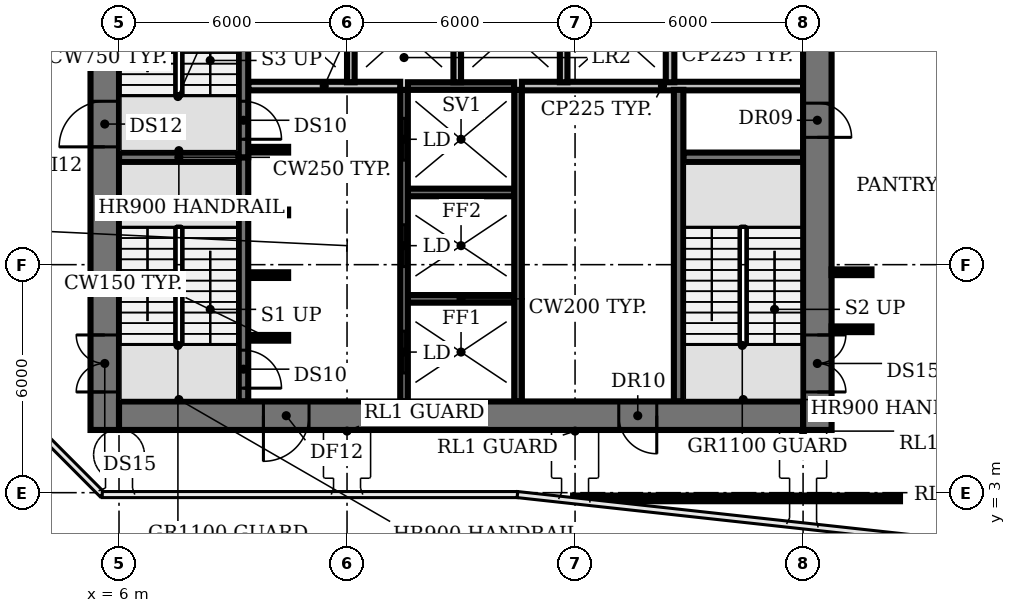
"""IFC4 building model, lengths in metres.
Left out: names, types, materials, properties, quantities, classifications, styles, units other than length and angle.
Written with IfcOpenShell. Run it as: python <this file> out.ifc"""

import sys

from ifc_helpers import new_model, si_unit, direction, frame, frame_2d, origin, place, context, subcontext, project, spatial, rectangle, extrude, element, fill, save


model = new_model("IFC4")
c1 = context("Model", 3, precision=1e-05, world=origin(), true_north=direction((0.0, 1.0)))
c2 = subcontext(c1, "Body", "Model", "MODEL_VIEW")
j1 = project(units=[si_unit("LENGTHUNIT", "METRE"), si_unit("PLANEANGLEUNIT", "RADIAN")], contexts=[c1])
p1 = place(None, origin())
s1 = spatial("IfcSite", under=j1, at=p1, CompositionType="ELEMENT")
p2 = place(p1, origin())
s2 = spatial("IfcBuilding", under=s1, at=p2, CompositionType="ELEMENT")
p3 = place(p2, frame((0.0, 0.0, 138.2)))
s3 = spatial("IfcBuildingStorey", under=s2, at=p3, CompositionType="ELEMENT", Elevation=138.2)
p4 = place(p3, frame((9.4, 7.075, 0.0), z_axis=(0.0, 0.0, 1.0), x_axis=(1.0, 0.0, 0.0)))
e1 = element("IfcWall", 1, at=p4, inside=s3, PredefinedType="SHEAR", context=c2, shape_type="SweptSolid", body=[
    extrude(rectangle(XDim=1.05, YDim=0.15, at=frame_2d((0.525, 0.0))), origin(), (0.0, 0.0, 1.0), 8.05),
])
p5 = place(p3, frame((13.6, 8.1, 0.0), z_axis=(0.0, 0.0, 1.0), x_axis=(1.0, 0.0, 0.0)))
e2 = element("IfcWall", 2, at=p5, inside=s3, PredefinedType="SHEAR", context=c2, shape_type="SweptSolid", body=[
    extrude(rectangle(XDim=2.8, YDim=0.2, at=frame_2d((1.4, 0.0))), origin(), (0.0, 0.0, 1.0), 8.05),
])
for number, where, z_axis, x_axis in (
    (3, (9.4, 8.725, 0.0), (0.0, 0.0, 1.0), (1.0, 0.0, 0.0)),
    (4, (9.4, 10.375, 0.0), (0.0, 0.0, 1.0), (1.0, 0.0, 0.0)),
):
    element("IfcWall", number, at=place(p3, frame(where, z_axis=z_axis, x_axis=x_axis)), inside=s3, PredefinedType="SHEAR", context=c2, shape_type="SweptSolid", body=[
        extrude(rectangle(XDim=1.05, YDim=0.15, at=frame_2d((0.525, 0.0))), origin(), (0.0, 0.0, 1.0), 8.05),
    ])
p6 = place(p3, frame((13.6, 10.9, 0.0), z_axis=(0.0, 0.0, 1.0), x_axis=(1.0, 0.0, 0.0)))
e5 = element("IfcWall", 5, at=p6, inside=s3, PredefinedType="SHEAR", context=c2, shape_type="SweptSolid", body=[
    extrude(rectangle(XDim=2.8, YDim=0.2, at=frame_2d((1.4, 0.0))), origin(), (0.0, 0.0, 1.0), 8.05),
])
for number, where, z_axis, x_axis in (
    (6, (6.0, 11.825, 0.0), (0.0, 0.0, 1.0), (1.0, 0.0, 0.0)),
    (7, (20.85, 11.825, 0.0), (0.0, 0.0, 1.0), (1.0, 0.0, 0.0)),
):
    element("IfcWall", number, at=place(p3, frame(where, z_axis=z_axis, x_axis=x_axis)), inside=s3, PredefinedType="SHEAR", context=c2, shape_type="SweptSolid", body=[
        extrude(rectangle(XDim=3.15, YDim=0.25, at=frame_2d((1.575, 0.0))), origin(), (0.0, 0.0, 1.0), 8.05),
    ])
p7 = place(p3, frame((9.4, 12.025, 0.0), z_axis=(0.0, 0.0, 1.0), x_axis=(1.0, 0.0, 0.0)))
e8 = element("IfcWall", 8, at=p7, inside=s3, PredefinedType="SHEAR", context=c2, shape_type="SweptSolid", body=[
    extrude(rectangle(XDim=1.05, YDim=0.15, at=frame_2d((0.525, 0.0))), origin(), (0.0, 0.0, 1.0), 8.05),
])
p8 = place(p3, frame((9.4, 13.7, 0.0), z_axis=(0.0, 0.0, 1.0), x_axis=(1.0, 0.0, 0.0)))
e9 = element("IfcWall", 9, at=p8, inside=s3, PredefinedType="PARTITIONING", context=c2, shape_type="SweptSolid", body=[
    extrude(rectangle(XDim=4.0, YDim=0.225, at=frame_2d((2.0, 0.0))), origin(), (0.0, 0.0, 1.0), 8.05),
])
p9 = place(p3, frame((13.6, 13.7, 0.0), z_axis=(0.0, 0.0, 1.0), x_axis=(1.0, 0.0, 0.0)))
e10 = element("IfcWall", 10, at=p9, inside=s3, PredefinedType="SHEAR", context=c2, shape_type="SweptSolid", body=[
    extrude(rectangle(XDim=2.8, YDim=0.2, at=frame_2d((1.4, 0.0))), origin(), (0.0, 0.0, 1.0), 8.05),
])
p10 = place(p3, frame((16.6, 13.7, 0.0), z_axis=(0.0, 0.0, 1.0), x_axis=(1.0, 0.0, 0.0)))
e11 = element("IfcWall", 11, at=p10, inside=s3, PredefinedType="PARTITIONING", context=c2, shape_type="SweptSolid", body=[
    extrude(rectangle(XDim=7.4, YDim=0.225, at=frame_2d((3.7, 0.0))), origin(), (0.0, 0.0, 1.0), 8.05),
])
p11 = place(p3, frame((9.275, 11.825, 0.0), z_axis=(0.0, 0.0, 1.0), x_axis=(0.0, -1.0, 0.0)))
e12 = element("IfcWall", 12, at=p11, inside=s3, PredefinedType="SHEAR", context=c2, shape_type="SweptSolid", body=[
    extrude(rectangle(XDim=6.425, YDim=0.25, at=frame_2d((3.212, 0.0))), origin(), (0.0, 0.0, 1.0), 8.05),
])
p12 = place(p11, frame((5.075, 0.0, 0.0)))
e13 = element("IfcOpeningElement", 13, at=p12, cuts=e12, PredefinedType="OPENING", context=c2, shape_type="SweptSolid", body=[
    extrude(rectangle(XDim=1.0, YDim=2.1, at=frame_2d((0.5, 1.05))), frame((0.0, 0.135, 0.0), z_axis=(0.0, -1.0, 0.0), x_axis=(1.0, 0.0, 0.0)), (0.0, 0.0, 1.0), 0.27),
])
p13 = place(p3, frame((9.275, 18.375, 0.0), z_axis=(0.0, 0.0, 1.0), x_axis=(0.0, -1.0, 0.0)))
e14 = element("IfcWall", 14, at=p13, inside=s3, PredefinedType="SHEAR", context=c2, shape_type="SweptSolid", body=[
    extrude(rectangle(XDim=6.55, YDim=0.25, at=frame_2d((3.275, 0.0))), origin(), (0.0, 0.0, 1.0), 8.05),
])
p14 = place(p13, frame((5.075, 0.0, 0.0)))
e15 = element("IfcOpeningElement", 15, at=p14, cuts=e14, PredefinedType="OPENING", context=c2, shape_type="SweptSolid", body=[
    extrude(rectangle(XDim=1.0, YDim=2.1, at=frame_2d((0.5, 1.05))), frame((0.0, 0.135, 0.0), z_axis=(0.0, -1.0, 0.0), x_axis=(1.0, 0.0, 0.0)), (0.0, 0.0, 1.0), 0.27),
])
p15 = place(p3, frame((12.1, 13.8, 0.0), z_axis=(0.0, 0.0, 1.0), x_axis=(0.0, 1.0, 0.0)))
e16 = element("IfcWall", 16, at=p15, inside=s3, PredefinedType="SOLIDWALL", context=c2, shape_type="SweptSolid", body=[
    extrude(rectangle(XDim=2.6, YDim=0.2, at=frame_2d((1.3, 0.0))), origin(), (0.0, 0.0, 1.0), 8.05),
])
p16 = place(p3, frame((13.5, 5.4, 0.0), z_axis=(0.0, 0.0, 1.0), x_axis=(0.0, 1.0, 0.0)))
e17 = element("IfcWall", 17, at=p16, inside=s3, PredefinedType="SHEAR", context=c2, shape_type="SweptSolid", body=[
    extrude(rectangle(XDim=8.2, YDim=0.2, at=frame_2d((4.1, 0.0))), origin(), (0.0, 0.0, 1.0), 8.05),
])
p17 = place(p16, frame((0.75, 0.0, 0.0)))
e18 = element("IfcOpeningElement", 18, at=p17, cuts=e17, PredefinedType="OPENING", context=c2, shape_type="SweptSolid", body=[
    extrude(rectangle(XDim=1.1, YDim=2.1, at=frame_2d((0.55, 1.05))), frame((0.0, 0.11, 0.0), z_axis=(0.0, -1.0, 0.0), x_axis=(1.0, 0.0, 0.0)), (0.0, 0.0, 1.0), 0.22),
])
p18 = place(p16, frame((3.55, 0.0, 0.0)))
e19 = element("IfcOpeningElement", 19, at=p18, cuts=e17, PredefinedType="OPENING", context=c2, shape_type="SweptSolid", body=[
    extrude(rectangle(XDim=1.1, YDim=2.1, at=frame_2d((0.55, 1.05))), frame((0.0, 0.11, 0.0), z_axis=(0.0, -1.0, 0.0), x_axis=(1.0, 0.0, 0.0)), (0.0, 0.0, 1.0), 0.22),
])
p19 = place(p16, frame((6.35, 0.0, 0.0)))
e20 = element("IfcOpeningElement", 20, at=p19, cuts=e17, PredefinedType="OPENING", context=c2, shape_type="SweptSolid", body=[
    extrude(rectangle(XDim=1.1, YDim=2.1, at=frame_2d((0.55, 1.05))), frame((0.0, 0.11, 0.0), z_axis=(0.0, -1.0, 0.0), x_axis=(1.0, 0.0, 0.0)), (0.0, 0.0, 1.0), 0.22),
])
p20 = place(p3, frame((14.9, 13.8, 0.0), z_axis=(0.0, 0.0, 1.0), x_axis=(0.0, 1.0, 0.0)))
e21 = element("IfcWall", 21, at=p20, inside=s3, PredefinedType="SOLIDWALL", context=c2, shape_type="SweptSolid", body=[
    extrude(rectangle(XDim=2.6, YDim=0.2, at=frame_2d((1.3, 0.0))), origin(), (0.0, 0.0, 1.0), 8.05),
])
p21 = place(p3, frame((16.5, 5.4, 0.0), z_axis=(0.0, 0.0, 1.0), x_axis=(0.0, 1.0, 0.0)))
e22 = element("IfcWall", 22, at=p21, inside=s3, PredefinedType="SHEAR", context=c2, shape_type="SweptSolid", body=[
    extrude(rectangle(XDim=8.2, YDim=0.2, at=frame_2d((4.1, 0.0))), origin(), (0.0, 0.0, 1.0), 8.05),
])
p22 = place(p3, frame((17.7, 13.8, 0.0), z_axis=(0.0, 0.0, 1.0), x_axis=(0.0, 1.0, 0.0)))
e23 = element("IfcWall", 23, at=p22, inside=s3, PredefinedType="SOLIDWALL", context=c2, shape_type="SweptSolid", body=[
    extrude(rectangle(XDim=2.6, YDim=0.2, at=frame_2d((1.3, 0.0))), origin(), (0.0, 0.0, 1.0), 8.05),
])
p23 = place(p3, frame((20.5, 13.8, 0.0), z_axis=(0.0, 0.0, 1.0), x_axis=(0.0, 1.0, 0.0)))
e24 = element("IfcWall", 24, at=p23, inside=s3, PredefinedType="PARTITIONING", context=c2, shape_type="SweptSolid", body=[
    extrude(rectangle(XDim=2.6, YDim=0.225, at=frame_2d((1.3, 0.0))), origin(), (0.0, 0.0, 1.0), 8.05),
])
p24 = place(p3, frame((20.725, 5.4, 0.0), z_axis=(0.0, 0.0, 1.0), x_axis=(0.0, 1.0, 0.0)))
e25 = element("IfcWall", 25, at=p24, inside=s3, PredefinedType="SHEAR", context=c2, shape_type="SweptSolid", body=[
    extrude(rectangle(XDim=8.2, YDim=0.25, at=frame_2d((4.1, 0.0))), origin(), (0.0, 0.0, 1.0), 8.05),
])
p25 = place(p3, frame((5.625, 4.65, 0.0), z_axis=(0.0, 0.0, 1.0), x_axis=(0.0, 1.0, 0.0)))
e26 = element("IfcWall", 26, at=p25, inside=s3, PredefinedType="SHEAR", context=c2, shape_type="SweptSolid", body=[
    extrude(rectangle(XDim=20.9, YDim=0.75, at=frame_2d((10.45, 0.0))), origin(), (0.0, 0.0, 1.0), 8.05),
])
p26 = place(p25, frame((1.0, 0.0, 0.0)))
e27 = element("IfcOpeningElement", 27, at=p26, cuts=e26, PredefinedType="OPENING", context=c2, shape_type="SweptSolid", body=[
    extrude(rectangle(XDim=1.5, YDim=2.1, at=frame_2d((0.75, 1.05))), frame((0.0, 0.385, 0.0), z_axis=(0.0, -1.0, 0.0), x_axis=(1.0, 0.0, 0.0)), (0.0, 0.0, 1.0), 0.77),
])
p27 = place(p25, frame((7.45, 0.0, 0.0)))
e28 = element("IfcOpeningElement", 28, at=p27, cuts=e26, PredefinedType="OPENING", context=c2, shape_type="SweptSolid", body=[
    extrude(rectangle(XDim=1.2, YDim=2.1, at=frame_2d((0.6, 1.05))), frame((0.0, 0.385, 0.0), z_axis=(0.0, -1.0, 0.0), x_axis=(1.0, 0.0, 0.0)), (0.0, 0.0, 1.0), 0.77),
])
p28 = place(p25, frame((14.0, 0.0, 0.0)))
e29 = element("IfcOpeningElement", 29, at=p28, cuts=e26, PredefinedType="OPENING", context=c2, shape_type="SweptSolid", body=[
    extrude(rectangle(XDim=1.2, YDim=2.1, at=frame_2d((0.6, 1.05))), frame((0.0, 0.385, 0.0), z_axis=(0.0, -1.0, 0.0), x_axis=(1.0, 0.0, 0.0)), (0.0, 0.0, 1.0), 0.77),
])
p29 = place(p3, frame((24.375, 25.55, 0.0), z_axis=(0.0, 0.0, 1.0), x_axis=(0.0, -1.0, 0.0)))
e30 = element("IfcWall", 30, at=p29, inside=s3, PredefinedType="SHEAR", context=c2, shape_type="SweptSolid", body=[
    extrude(rectangle(XDim=20.9, YDim=0.75, at=frame_2d((10.45, 0.0))), origin(), (0.0, 0.0, 1.0), 8.05),
])
p30 = place(p29, frame((18.4, 0.0, 0.0)))
e31 = element("IfcOpeningElement", 31, at=p30, cuts=e30, PredefinedType="OPENING", context=c2, shape_type="SweptSolid", body=[
    extrude(rectangle(XDim=1.5, YDim=2.1, at=frame_2d((0.75, 1.05))), frame((0.0, 0.385, 0.0), z_axis=(0.0, -1.0, 0.0), x_axis=(1.0, 0.0, 0.0)), (0.0, 0.0, 1.0), 0.77),
])
p31 = place(p29, frame((12.3, 0.0, 0.0)))
e32 = element("IfcOpeningElement", 32, at=p31, cuts=e30, PredefinedType="OPENING", context=c2, shape_type="SweptSolid", body=[
    extrude(rectangle(XDim=0.9, YDim=2.1, at=frame_2d((0.45, 1.05))), frame((0.0, 0.385, 0.0), z_axis=(0.0, -1.0, 0.0), x_axis=(1.0, 0.0, 0.0)), (0.0, 0.0, 1.0), 0.77),
])
p32 = place(p29, frame((6.3, 0.0, 0.0)))
e33 = element("IfcOpeningElement", 33, at=p32, cuts=e30, PredefinedType="OPENING", context=c2, shape_type="SweptSolid", body=[
    extrude(rectangle(XDim=2.0, YDim=2.1, at=frame_2d((1.0, 1.05))), frame((0.0, 0.385, 0.0), z_axis=(0.0, -1.0, 0.0), x_axis=(1.0, 0.0, 0.0)), (0.0, 0.0, 1.0), 0.77),
])
p33 = place(p3, frame((24.0, 5.025, 0.0), z_axis=(0.0, 0.0, 1.0), x_axis=(-1.0, 0.0, 0.0)))
e34 = element("IfcWall", 34, at=p33, inside=s3, PredefinedType="SHEAR", context=c2, shape_type="SweptSolid", body=[
    extrude(rectangle(XDim=18.0, YDim=0.75, at=frame_2d((9.0, 0.0))), origin(), (0.0, 0.0, 1.0), 8.05),
])
p34 = place(p33, frame((13.0, 0.0, 0.0)))
e35 = element("IfcOpeningElement", 35, at=p34, cuts=e34, PredefinedType="OPENING", context=c2, shape_type="SweptSolid", body=[
    extrude(rectangle(XDim=1.2, YDim=2.1, at=frame_2d((0.6, 1.05))), frame((0.0, 0.385, 0.0), z_axis=(0.0, -1.0, 0.0), x_axis=(1.0, 0.0, 0.0)), (0.0, 0.0, 1.0), 0.77),
])
p35 = place(p33, frame((3.85, 0.0, 0.0)))
e36 = element("IfcOpeningElement", 36, at=p35, cuts=e34, PredefinedType="OPENING", context=c2, shape_type="SweptSolid", body=[
    extrude(rectangle(XDim=1.0, YDim=2.1, at=frame_2d((0.5, 1.05))), frame((0.0, 0.385, 0.0), z_axis=(0.0, -1.0, 0.0), x_axis=(1.0, 0.0, 0.0)), (0.0, 0.0, 1.0), 0.77),
])
p36 = place(p3, frame((17.949, 2.85, 0.0), z_axis=(0.0, 0.0, 1.0), x_axis=(1.0, 0.0, 0.0)))
e37 = element("IfcWall", 37, at=p36, inside=s3, PredefinedType="PARTITIONING", context=c2, shape_type="SweptSolid", body=[
    extrude(rectangle(XDim=8.601, YDim=0.15, at=frame_2d((4.301, 0.0))), origin(), (0.0, 0.0, 1.0), 6.33),
])
for number, where, z_axis, x_axis in (
    (38, (24.75, 7.3, 0.0), (0.0, 0.0, 1.0), (1.0, 0.0, 0.0)),
    (39, (24.75, 8.8, 0.0), (0.0, 0.0, 1.0), (1.0, 0.0, 0.0)),
):
    element("IfcWall", number, at=place(p3, frame(where, z_axis=z_axis, x_axis=x_axis)), inside=s3, PredefinedType="PARTITIONING", context=c2, shape_type="SweptSolid", body=[
        extrude(rectangle(XDim=1.05, YDim=0.15, at=frame_2d((0.525, 0.0))), origin(), (0.0, 0.0, 1.0), 6.33),
    ])
p37 = place(p12, origin())
e40 = element("IfcDoor", 40, at=p37, inside=s3, OperationType="SINGLE_SWING_RIGHT", PredefinedType="DOOR", context=c2, shape_type="SweptSolid", body=[
    extrude(rectangle(XDim=1.0, YDim=2.1, at=frame_2d((0.5, 1.05))), frame((0.0, 0.025, 0.0), z_axis=(0.0, -1.0, 0.0), x_axis=(1.0, 0.0, 0.0)), (0.0, 0.0, 1.0), 0.05),
])
fill(e13, e40)
p38 = place(p14, origin())
e41 = element("IfcDoor", 41, at=p38, inside=s3, OperationType="SINGLE_SWING_RIGHT", PredefinedType="DOOR", context=c2, shape_type="SweptSolid", body=[
    extrude(rectangle(XDim=1.0, YDim=2.1, at=frame_2d((0.5, 1.05))), frame((0.0, 0.025, 0.0), z_axis=(0.0, -1.0, 0.0), x_axis=(1.0, 0.0, 0.0)), (0.0, 0.0, 1.0), 0.05),
])
fill(e15, e41)
p39 = place(p17, origin())
e42 = element("IfcDoor", 42, at=p39, inside=s3, OperationType="DOUBLE_DOOR_SLIDING", PredefinedType="DOOR", context=c2, shape_type="SweptSolid", body=[
    extrude(rectangle(XDim=1.1, YDim=2.1, at=frame_2d((0.55, 1.05))), frame((0.0, 0.025, 0.0), z_axis=(0.0, -1.0, 0.0), x_axis=(1.0, 0.0, 0.0)), (0.0, 0.0, 1.0), 0.05),
])
fill(e18, e42)
p40 = place(p18, origin())
e43 = element("IfcDoor", 43, at=p40, inside=s3, OperationType="DOUBLE_DOOR_SLIDING", PredefinedType="DOOR", context=c2, shape_type="SweptSolid", body=[
    extrude(rectangle(XDim=1.1, YDim=2.1, at=frame_2d((0.55, 1.05))), frame((0.0, 0.025, 0.0), z_axis=(0.0, -1.0, 0.0), x_axis=(1.0, 0.0, 0.0)), (0.0, 0.0, 1.0), 0.05),
])
fill(e19, e43)
p41 = place(p19, origin())
e44 = element("IfcDoor", 44, at=p41, inside=s3, OperationType="DOUBLE_DOOR_SLIDING", PredefinedType="DOOR", context=c2, shape_type="SweptSolid", body=[
    extrude(rectangle(XDim=1.1, YDim=2.1, at=frame_2d((0.55, 1.05))), frame((0.0, 0.025, 0.0), z_axis=(0.0, -1.0, 0.0), x_axis=(1.0, 0.0, 0.0)), (0.0, 0.0, 1.0), 0.05),
])
fill(e20, e44)
p42 = place(p26, origin())
e45 = element("IfcDoor", 45, at=p42, inside=s3, OperationType="DOUBLE_DOOR_SINGLE_SWING", PredefinedType="DOOR", context=c2, shape_type="SweptSolid", body=[
    extrude(rectangle(XDim=1.5, YDim=2.1, at=frame_2d((0.75, 1.05))), frame((0.0, 0.025, 0.0), z_axis=(0.0, -1.0, 0.0), x_axis=(1.0, 0.0, 0.0)), (0.0, 0.0, 1.0), 0.05),
])
fill(e27, e45)
p43 = place(p27, origin())
e46 = element("IfcDoor", 46, at=p43, inside=s3, OperationType="SINGLE_SWING_LEFT", PredefinedType="DOOR", context=c2, shape_type="SweptSolid", body=[
    extrude(rectangle(XDim=1.2, YDim=2.1, at=frame_2d((0.6, 1.05))), frame((0.0, 0.025, 0.0), z_axis=(0.0, -1.0, 0.0), x_axis=(1.0, 0.0, 0.0)), (0.0, 0.0, 1.0), 0.05),
])
fill(e28, e46)
p44 = place(p30, origin())
e47 = element("IfcDoor", 47, at=p44, inside=s3, OperationType="DOUBLE_DOOR_SINGLE_SWING", PredefinedType="DOOR", context=c2, shape_type="SweptSolid", body=[
    extrude(rectangle(XDim=1.5, YDim=2.1, at=frame_2d((0.75, 1.05))), frame((0.0, 0.025, 0.0), z_axis=(0.0, -1.0, 0.0), x_axis=(1.0, 0.0, 0.0)), (0.0, 0.0, 1.0), 0.05),
])
fill(e31, e47)
p45 = place(p31, origin())
e48 = element("IfcDoor", 48, at=p45, inside=s3, OperationType="SINGLE_SWING_RIGHT", PredefinedType="DOOR", context=c2, shape_type="SweptSolid", body=[
    extrude(rectangle(XDim=0.9, YDim=2.1, at=frame_2d((0.45, 1.05))), frame((0.0, -0.315, 0.0), z_axis=(0.0, -1.0, 0.0), x_axis=(1.0, 0.0, 0.0)), (0.0, 0.0, 1.0), 0.05),
])
fill(e32, e48)
p46 = place(p34, origin())
e49 = element("IfcDoor", 49, at=p46, inside=s3, OperationType="SINGLE_SWING_RIGHT", PredefinedType="DOOR", context=c2, shape_type="SweptSolid", body=[
    extrude(rectangle(XDim=1.2, YDim=2.1, at=frame_2d((0.6, 1.05))), frame((0.0, 0.025, 0.0), z_axis=(0.0, -1.0, 0.0), x_axis=(1.0, 0.0, 0.0)), (0.0, 0.0, 1.0), 0.05),
])
fill(e35, e49)
p47 = place(p35, origin())
e50 = element("IfcDoor", 50, at=p47, inside=s3, OperationType="SINGLE_SWING_LEFT", PredefinedType="DOOR", context=c2, shape_type="SweptSolid", body=[
    extrude(rectangle(XDim=1.0, YDim=2.1, at=frame_2d((0.5, 1.05))), frame((0.0, -0.315, 0.0), z_axis=(0.0, -1.0, 0.0), x_axis=(1.0, 0.0, 0.0)), (0.0, 0.0, 1.0), 0.05),
])
fill(e36, e50)
save(model, sys.argv[1])
